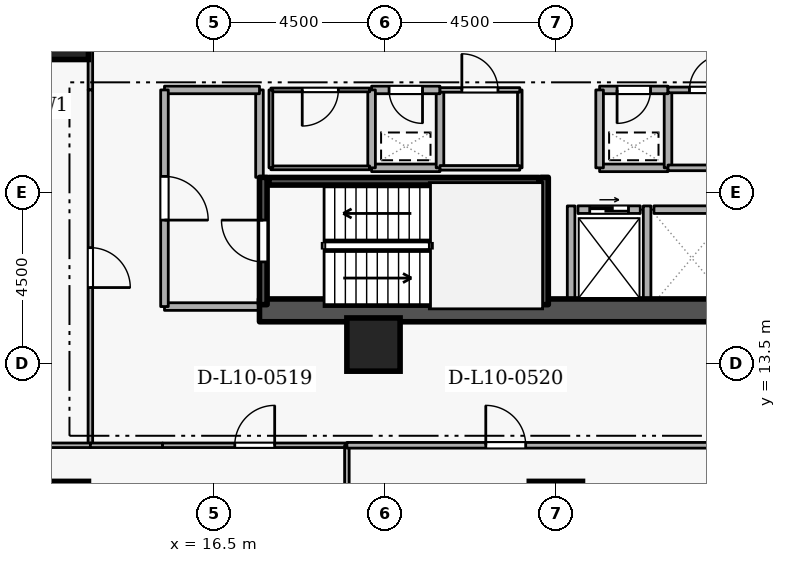
"""IFC4 building model, lengths in metres.
Left out: names, types, materials, properties, quantities, classifications, styles, units other than length and angle.
Written with IfcOpenShell. Run it as: python <this file> out.ifc"""

import sys

from ifc_helpers import new_model, si_unit, direction, frame, frame_2d, origin, origin_2d, place, context, subcontext, project, spatial, rectangle, extrude, element, fill, save


model = new_model("IFC4")
c1 = context("Model", 3, precision=1e-05, world=origin(), true_north=direction((0.0, 1.0)))
c2 = subcontext(c1, "Body", "Model", "MODEL_VIEW")
j1 = project(units=[si_unit("LENGTHUNIT", "METRE"), si_unit("PLANEANGLEUNIT", "RADIAN")], contexts=[c1])
p1 = place(None, origin())
s1 = spatial("IfcSite", under=j1, at=p1, CompositionType="ELEMENT")
p2 = place(p1, origin())
s2 = spatial("IfcBuilding", under=s1, at=p2, CompositionType="ELEMENT")
p3 = place(p2, frame((0.0, 0.0, 42.3)))
s3 = spatial("IfcBuildingStorey", under=s2, at=p3, CompositionType="ELEMENT", Elevation=42.3)
p4 = place(p3, frame((17.7, 14.9, 0.0), z_axis=(0.0, 0.0, 1.0), x_axis=(1.0, 0.0, 0.0)))
e1 = element("IfcWall", 1, at=p4, inside=s3, PredefinedType="SHEAR", context=c2, shape_type="SweptSolid", body=[
    extrude(rectangle(XDim=15.6, YDim=0.6, at=frame_2d((7.8, 0.0))), origin(), (0.0, 0.0, 1.0), 3.6),
])
for number, where, z_axis, x_axis in (
    (2, (12.5, 9.7, 0.0), (0.0, 0.0, 1.0), (1.0, 0.0, 0.0)),
    (3, (25.5, 9.7, 0.0), (0.0, 0.0, 1.0), (1.0, 0.0, 0.0)),
    (4, (12.5, 22.2, 0.0), (0.0, 0.0, 1.0), (1.0, 0.0, 0.0)),
    (5, (20.7, 14.0, 0.0), (0.0, 0.0, 1.0), (1.0, 0.0, 0.0)),
):
    element("IfcColumn", number, at=place(p3, frame(where, z_axis=z_axis, x_axis=x_axis)), inside=s3, PredefinedType="COLUMN", context=c2, shape_type="SweptSolid", body=[
        extrude(rectangle(XDim=1.4, YDim=1.4, at=origin_2d()), origin(), (0.0, 0.0, 1.0), 3.6),
    ])
p5 = place(p3, frame((26.08, 17.55, 0.0), z_axis=(0.0, 0.0, 1.0), x_axis=(1.0, 0.0, 0.0)))
e6 = element("IfcWall", 6, at=p5, inside=s3, PredefinedType="STANDARD", context=c2, shape_type="SweptSolid", body=[
    extrude(rectangle(XDim=1.64, YDim=0.2, at=frame_2d((0.82, 0.0))), origin(), (0.0, 0.0, 1.0), 3.34),
])
p6 = place(p5, frame((0.31, 0.0, 0.0)))
e7 = element("IfcOpeningElement", 7, at=p6, cuts=e6, PredefinedType="OPENING", context=c2, shape_type="SweptSolid", body=[
    extrude(rectangle(XDim=1.02, YDim=2.06, at=frame_2d((0.51, 1.03))), frame((0.0, 0.11, 0.0), z_axis=(0.0, -1.0, 0.0), x_axis=(1.0, 0.0, 0.0)), (0.0, 0.0, 1.0), 0.22),
])
p7 = place(p3, frame((28.08, 17.55, 0.0), z_axis=(0.0, 0.0, 1.0), x_axis=(1.0, 0.0, 0.0)))
e8 = element("IfcWall", 8, at=p7, inside=s3, PredefinedType="STANDARD", context=c2, shape_type="SweptSolid", body=[
    extrude(rectangle(XDim=1.99, YDim=0.2, at=frame_2d((0.995, 0.0))), origin(), (0.0, 0.0, 1.0), 3.34),
])
for number, where, z_axis, x_axis in (
    (9, (27.9, 15.212, 0.0), (0.0, 0.0, 1.0), (0.0, 1.0, 0.0)),
    (10, (25.9, 15.212, 0.0), (0.0, 0.0, 1.0), (0.0, 1.0, 0.0)),
):
    element("IfcWall", number, at=place(p3, frame(where, z_axis=z_axis, x_axis=x_axis)), inside=s3, PredefinedType="STANDARD", context=c2, shape_type="SweptSolid", body=[
        extrude(rectangle(XDim=2.436, YDim=0.2, at=frame_2d((1.218, 0.0))), origin(), (0.0, 0.0, 1.0), 3.34),
    ])
p8 = place(p3, frame((17.8, 15.05, 0.0), z_axis=(0.0, 0.0, 1.0), x_axis=(0.0, 1.0, 0.0)))
e11 = element("IfcWall", 11, at=p8, inside=s3, PredefinedType="SHEAR", context=c2, shape_type="SweptSolid", body=[
    extrude(rectangle(XDim=3.35, YDim=0.2, at=frame_2d((1.675, 0.0))), origin(), (0.0, 0.0, 1.0), 3.6),
])
p9 = place(p8, frame((1.125, 0.0, 0.0)))
e12 = element("IfcOpeningElement", 12, at=p9, cuts=e11, PredefinedType="OPENING", context=c2, shape_type="SweptSolid", body=[
    extrude(rectangle(XDim=1.1, YDim=2.1, at=frame_2d((0.55, 1.05))), frame((0.0, 0.11, 0.0), z_axis=(0.0, -1.0, 0.0), x_axis=(1.0, 0.0, 0.0)), (0.0, 0.0, 1.0), 0.22),
])
p10 = place(p3, frame((25.2, 18.4, 0.0), z_axis=(0.0, 0.0, 1.0), x_axis=(0.0, -1.0, 0.0)))
e13 = element("IfcWall", 13, at=p10, inside=s3, PredefinedType="SHEAR", context=c2, shape_type="SweptSolid", body=[
    extrude(rectangle(XDim=3.35, YDim=0.2, at=frame_2d((1.675, 0.0))), origin(), (0.0, 0.0, 1.0), 3.6),
])
p11 = place(p3, frame((25.05, 18.297, 0.0), z_axis=(0.0, 0.0, 1.0), x_axis=(-1.0, 0.0, 0.0)))
e14 = element("IfcWall", 14, at=p11, inside=s3, PredefinedType="SHEAR", context=c2, shape_type="SweptSolid", body=[
    extrude(rectangle(XDim=7.1, YDim=0.2, at=frame_2d((3.55, 0.0))), origin(), (0.0, 0.0, 1.0), 3.6),
])
p12 = place(p3, frame((15.2, 15.0, 0.0), z_axis=(0.0, 0.0, 1.0), x_axis=(1.0, 0.0, 0.0)))
e15 = element("IfcWall", 15, at=p12, inside=s3, PredefinedType="STANDARD", context=c2, shape_type="SweptSolid", body=[
    extrude(rectangle(XDim=2.5, YDim=0.2, at=frame_2d((1.25, 0.0))), origin(), (0.0, 0.0, 1.0), 3.34),
])
p13 = place(p3, frame((17.7, 18.4, 0.0), z_axis=(0.0, 0.0, 1.0), x_axis=(0.0, 1.0, 0.0)))
e16 = element("IfcWall", 16, at=p13, inside=s3, PredefinedType="STANDARD", context=c2, shape_type="SweptSolid", body=[
    extrude(rectangle(XDim=2.3, YDim=0.2, at=frame_2d((1.15, 0.0))), origin(), (0.0, 0.0, 1.0), 2.545),
])
p14 = place(p3, frame((17.7, 20.7, 0.0), z_axis=(0.0, 0.0, 1.0), x_axis=(-1.0, 0.0, 0.0)))
e17 = element("IfcWall", 17, at=p14, inside=s3, PredefinedType="STANDARD", context=c2, shape_type="SweptSolid", body=[
    extrude(rectangle(XDim=2.5, YDim=0.2, at=frame_2d((1.25, 0.0))), origin(), (0.0, 0.0, 1.0), 3.34),
])
p15 = place(p3, frame((15.2, 20.7, 0.0), z_axis=(0.0, 0.0, 1.0), x_axis=(0.0, -1.0, 0.0)))
e18 = element("IfcWall", 18, at=p15, inside=s3, PredefinedType="STANDARD", context=c2, shape_type="SweptSolid", body=[
    extrude(rectangle(XDim=5.7, YDim=0.2, at=frame_2d((2.85, 0.0))), origin(), (0.0, 0.0, 1.0), 3.34),
])
p16 = place(p15, frame((2.275, 0.0, 0.0)))
e19 = element("IfcOpeningElement", 19, at=p16, cuts=e18, PredefinedType="OPENING", context=c2, shape_type="SweptSolid", body=[
    extrude(rectangle(XDim=1.15, YDim=2.1, at=frame_2d((0.575, 1.05))), frame((0.0, 0.11, 0.0), z_axis=(0.0, -1.0, 0.0), x_axis=(1.0, 0.0, 0.0)), (0.0, 0.0, 1.0), 0.22),
])
p17 = place(p3, frame((26.65, 18.65, 0.0), z_axis=(0.0, 0.0, 1.0), x_axis=(1.0, 0.0, 0.0)))
e20 = element("IfcWall", 20, at=p17, inside=s3, PredefinedType="STANDARD", context=c2, shape_type="SweptSolid", body=[
    extrude(rectangle(XDim=1.8, YDim=0.2, at=frame_2d((0.9, 0.0))), origin(), (0.0, 0.0, 1.0), 3.34),
])
p18 = place(p3, frame((28.45, 18.65, 0.0), z_axis=(0.0, 0.0, 1.0), x_axis=(0.0, 1.0, 0.0)))
e21 = element("IfcWall", 21, at=p18, inside=s3, PredefinedType="STANDARD", context=c2, shape_type="SweptSolid", body=[
    extrude(rectangle(XDim=2.05, YDim=0.2, at=frame_2d((1.025, 0.0))), origin(), (0.0, 0.0, 1.0), 3.34),
])
p19 = place(p3, frame((28.45, 20.7, 0.0), z_axis=(0.0, 0.0, 1.0), x_axis=(-1.0, 0.0, 0.0)))
e22 = element("IfcWall", 22, at=p19, inside=s3, PredefinedType="STANDARD", context=c2, shape_type="SweptSolid", body=[
    extrude(rectangle(XDim=1.8, YDim=0.2, at=frame_2d((0.9, 0.0))), origin(), (0.0, 0.0, 1.0), 3.34),
])
p20 = place(p19, frame((0.46, 0.0, 0.0)))
e23 = element("IfcOpeningElement", 23, at=p20, cuts=e22, PredefinedType="OPENING", context=c2, shape_type="SweptSolid", body=[
    extrude(rectangle(XDim=0.88, YDim=2.04, at=frame_2d((0.44, 1.02))), frame((0.0, 0.11, 0.0), z_axis=(0.0, -1.0, 0.0), x_axis=(1.0, 0.0, 0.0)), (0.0, 0.0, 1.0), 0.22),
])
p21 = place(p3, frame((26.65, 20.7, 0.0), z_axis=(0.0, 0.0, 1.0), x_axis=(0.0, -1.0, 0.0)))
e24 = element("IfcWall", 24, at=p21, inside=s3, PredefinedType="STANDARD", context=c2, shape_type="SweptSolid", body=[
    extrude(rectangle(XDim=2.05, YDim=0.2, at=frame_2d((1.025, 0.0))), origin(), (0.0, 0.0, 1.0), 3.34),
])
p22 = place(p3, frame((20.65, 18.65, 0.0), z_axis=(0.0, 0.0, 1.0), x_axis=(1.0, 0.0, 0.0)))
e25 = element("IfcWall", 25, at=p22, inside=s3, PredefinedType="STANDARD", context=c2, shape_type="SweptSolid", body=[
    extrude(rectangle(XDim=1.8, YDim=0.2, at=frame_2d((0.9, 0.0))), origin(), (0.0, 0.0, 1.0), 3.34),
])
p23 = place(p3, frame((22.45, 18.65, 0.0), z_axis=(0.0, 0.0, 1.0), x_axis=(0.0, 1.0, 0.0)))
e26 = element("IfcWall", 26, at=p23, inside=s3, PredefinedType="STANDARD", context=c2, shape_type="SweptSolid", body=[
    extrude(rectangle(XDim=2.05, YDim=0.2, at=frame_2d((1.025, 0.0))), origin(), (0.0, 0.0, 1.0), 3.34),
])
p24 = place(p3, frame((22.45, 20.7, 0.0), z_axis=(0.0, 0.0, 1.0), x_axis=(-1.0, 0.0, 0.0)))
e27 = element("IfcWall", 27, at=p24, inside=s3, PredefinedType="STANDARD", context=c2, shape_type="SweptSolid", body=[
    extrude(rectangle(XDim=1.8, YDim=0.2, at=frame_2d((0.9, 0.0))), origin(), (0.0, 0.0, 1.0), 3.34),
])
p25 = place(p24, frame((0.46, 0.0, 0.0)))
e28 = element("IfcOpeningElement", 28, at=p25, cuts=e27, PredefinedType="OPENING", context=c2, shape_type="SweptSolid", body=[
    extrude(rectangle(XDim=0.88, YDim=2.04, at=frame_2d((0.44, 1.02))), frame((0.0, 0.11, 0.0), z_axis=(0.0, -1.0, 0.0), x_axis=(1.0, 0.0, 0.0)), (0.0, 0.0, 1.0), 0.22),
])
p26 = place(p3, frame((20.65, 20.7, 0.0), z_axis=(0.0, 0.0, 1.0), x_axis=(0.0, -1.0, 0.0)))
e29 = element("IfcWall", 29, at=p26, inside=s3, PredefinedType="STANDARD", context=c2, shape_type="SweptSolid", body=[
    extrude(rectangle(XDim=2.05, YDim=0.2, at=frame_2d((1.025, 0.0))), origin(), (0.0, 0.0, 1.0), 3.34),
])
p27 = place(p3, frame((18.0, 18.65, 0.0), z_axis=(0.0, 0.0, 1.0), x_axis=(1.0, 0.0, 0.0)))
e30 = element("IfcWall", 30, at=p27, inside=s3, PredefinedType="PARTITIONING", context=c2, shape_type="SweptSolid", body=[
    extrude(rectangle(XDim=2.6, YDim=0.1, at=frame_2d((1.3, 0.0))), origin(), (0.0, 0.0, 1.0), 3.34),
])
p28 = place(p3, frame((20.6, 20.7, 0.0), z_axis=(0.0, 0.0, 1.0), x_axis=(-1.0, 0.0, 0.0)))
e31 = element("IfcWall", 31, at=p28, inside=s3, PredefinedType="PARTITIONING", context=c2, shape_type="SweptSolid", body=[
    extrude(rectangle(XDim=2.6, YDim=0.1, at=frame_2d((1.3, 0.0))), origin(), (0.0, 0.0, 1.0), 3.34),
])
p29 = place(p28, frame((0.825, 0.0, 0.0)))
e32 = element("IfcOpeningElement", 32, at=p29, cuts=e31, PredefinedType="OPENING", context=c2, shape_type="SweptSolid", body=[
    extrude(rectangle(XDim=0.95, YDim=2.1, at=frame_2d((0.475, 1.05))), frame((0.0, 0.06, 0.0), z_axis=(0.0, -1.0, 0.0), x_axis=(1.0, 0.0, 0.0)), (0.0, 0.0, 1.0), 0.12),
])
p30 = place(p3, frame((18.0, 20.7, 0.0), z_axis=(0.0, 0.0, 1.0), x_axis=(0.0, -1.0, 0.0)))
e33 = element("IfcWall", 33, at=p30, inside=s3, PredefinedType="PARTITIONING", context=c2, shape_type="SweptSolid", body=[
    extrude(rectangle(XDim=2.05, YDim=0.1, at=frame_2d((1.025, 0.0))), origin(), (0.0, 0.0, 1.0), 2.545),
])
p31 = place(p3, frame((24.55, 20.7, 0.0), z_axis=(0.0, 0.0, 1.0), x_axis=(0.0, -1.0, 0.0)))
e34 = element("IfcWall", 34, at=p31, inside=s3, PredefinedType="PARTITIONING", context=c2, shape_type="SweptSolid", body=[
    extrude(rectangle(XDim=2.05, YDim=0.12, at=frame_2d((1.025, 0.0))), origin(), (0.0, 0.0, 1.0), 3.34),
])
p32 = place(p3, frame((24.55, 18.65, 0.0), z_axis=(0.0, 0.0, 1.0), x_axis=(-1.0, 0.0, 0.0)))
e35 = element("IfcWall", 35, at=p32, inside=s3, PredefinedType="PARTITIONING", context=c2, shape_type="SweptSolid", body=[
    extrude(rectangle(XDim=2.1, YDim=0.12, at=frame_2d((1.05, 0.0))), origin(), (0.0, 0.0, 1.0), 3.34),
])
p33 = place(p3, frame((22.45, 20.7, 0.0), z_axis=(0.0, 0.0, 1.0), x_axis=(1.0, 0.0, 0.0)))
e36 = element("IfcWall", 36, at=p33, inside=s3, PredefinedType="PARTITIONING", context=c2, shape_type="SweptSolid", body=[
    extrude(rectangle(XDim=2.1, YDim=0.12, at=frame_2d((1.05, 0.0))), origin(), (0.0, 0.0, 1.0), 3.34),
])
p34 = place(p33, frame((0.575, 0.0, 0.0)))
e37 = element("IfcOpeningElement", 37, at=p34, cuts=e36, PredefinedType="OPENING", context=c2, shape_type="SweptSolid", body=[
    extrude(rectangle(XDim=0.95, YDim=2.1, at=frame_2d((0.475, 1.05))), frame((0.0, 0.07, 0.0), z_axis=(0.0, -1.0, 0.0), x_axis=(1.0, 0.0, 0.0)), (0.0, 0.0, 1.0), 0.14),
])
p35 = place(p3, frame((30.5, 18.65, 0.0), z_axis=(0.0, 0.0, 1.0), x_axis=(-1.0, 0.0, 0.0)))
e38 = element("IfcWall", 38, at=p35, inside=s3, PredefinedType="PARTITIONING", context=c2, shape_type="SweptSolid", body=[
    extrude(rectangle(XDim=2.05, YDim=0.15, at=frame_2d((1.025, 0.0))), origin(), (0.0, 0.0, 1.0), 3.34),
])
p36 = place(p3, frame((28.45, 20.7, 0.0), z_axis=(0.0, 0.0, 1.0), x_axis=(1.0, 0.0, 0.0)))
e39 = element("IfcWall", 39, at=p36, inside=s3, PredefinedType="PARTITIONING", context=c2, shape_type="SweptSolid", body=[
    extrude(rectangle(XDim=2.05, YDim=0.15, at=frame_2d((1.025, 0.0))), origin(), (0.0, 0.0, 1.0), 3.34),
])
p37 = place(p36, frame((0.565, 0.0, 0.0)))
e40 = element("IfcOpeningElement", 40, at=p37, cuts=e39, PredefinedType="OPENING", context=c2, shape_type="SweptSolid", body=[
    extrude(rectangle(XDim=0.92, YDim=2.08, at=frame_2d((0.46, 1.04))), frame((0.0, 0.085, 0.0), z_axis=(0.0, -1.0, 0.0), x_axis=(1.0, 0.0, 0.0)), (0.0, 0.0, 1.0), 0.17),
])
p38 = place(p3, frame((13.25, 22.55, 0.0), z_axis=(0.0, 0.0, 1.0), x_axis=(0.0, -1.0, 0.0)))
e41 = element("IfcWall", 41, at=p38, inside=s3, PredefinedType="PARTITIONING", context=c2, shape_type="SweptSolid", body=[
    extrude(rectangle(XDim=1.85, YDim=0.12, at=frame_2d((0.925, 0.0))), origin(), (0.0, 0.0, 1.0), 3.34),
])
p39 = place(p3, frame((13.25, 20.7, 0.0), z_axis=(0.0, 0.0, 1.0), x_axis=(0.0, -1.0, 0.0)))
e42 = element("IfcWall", 42, at=p39, inside=s3, PredefinedType="PARTITIONING", context=c2, shape_type="SweptSolid", body=[
    extrude(rectangle(XDim=9.35, YDim=0.12, at=frame_2d((4.675, 0.0))), origin(), (0.0, 0.0, 1.0), 3.34),
])
p40 = place(p39, frame((4.15, 0.0, 0.0)))
e43 = element("IfcOpeningElement", 43, at=p40, cuts=e42, PredefinedType="OPENING", context=c2, shape_type="SweptSolid", body=[
    extrude(rectangle(XDim=1.05, YDim=2.1, at=frame_2d((0.525, 1.05))), frame((0.0, 0.07, 0.0), z_axis=(0.0, -1.0, 0.0), x_axis=(1.0, 0.0, 0.0)), (0.0, 0.0, 1.0), 0.14),
])
p41 = place(p3, frame((13.25, 11.35, 0.0), z_axis=(0.0, 0.0, 1.0), x_axis=(-1.0, 0.0, 0.0)))
e44 = element("IfcWall", 44, at=p41, inside=s3, PredefinedType="PARTITIONING", context=c2, shape_type="SweptSolid", body=[
    extrude(rectangle(XDim=11.97, YDim=0.12, at=frame_2d((5.985, 0.0))), origin(), (0.0, 0.0, 1.0), 3.34),
])
p42 = place(p3, frame((13.25, 11.35, 0.0), z_axis=(0.0, 0.0, 1.0), x_axis=(1.0, 0.0, 0.0)))
e45 = element("IfcWall", 45, at=p42, inside=s3, PredefinedType="PARTITIONING", context=c2, shape_type="SweptSolid", body=[
    extrude(rectangle(XDim=1.9, YDim=0.12, at=frame_2d((0.95, 0.0))), origin(), (0.0, 0.0, 1.0), 3.34),
])
p43 = place(p3, frame((15.15, 11.35, 0.0), z_axis=(0.0, 0.0, 1.0), x_axis=(1.0, 0.0, 0.0)))
e46 = element("IfcWall", 46, at=p43, inside=s3, PredefinedType="PARTITIONING", context=c2, shape_type="SweptSolid", body=[
    extrude(rectangle(XDim=4.85, YDim=0.12, at=frame_2d((2.425, 0.0))), origin(), (0.0, 0.0, 1.0), 3.34),
])
p44 = place(p43, frame((1.9, 0.0, 0.0)))
e47 = element("IfcOpeningElement", 47, at=p44, cuts=e46, PredefinedType="OPENING", context=c2, shape_type="SweptSolid", body=[
    extrude(rectangle(XDim=1.05, YDim=2.1, at=frame_2d((0.525, 1.05))), frame((0.0, 0.07, 0.0), z_axis=(0.0, -1.0, 0.0), x_axis=(1.0, 0.0, 0.0)), (0.0, 0.0, 1.0), 0.14),
])
p45 = place(p3, frame((20.0, 11.35, 0.0), z_axis=(0.0, 0.0, 1.0), x_axis=(0.0, -1.0, 0.0)))
e48 = element("IfcWall", 48, at=p45, inside=s3, PredefinedType="PARTITIONING", context=c2, shape_type="SweptSolid", body=[
    extrude(rectangle(XDim=8.57, YDim=0.12, at=frame_2d((4.285, 0.0))), origin(), (0.0, 0.0, 1.0), 3.34),
])
p46 = place(p3, frame((20.0, 11.35, 0.0), z_axis=(0.0, 0.0, 1.0), x_axis=(1.0, 0.0, 0.0)))
e49 = element("IfcWall", 49, at=p46, inside=s3, PredefinedType="PARTITIONING", context=c2, shape_type="SweptSolid", body=[
    extrude(rectangle(XDim=11.0, YDim=0.15, at=frame_2d((5.5, 0.0))), origin(), (0.0, 0.0, 1.0), 3.34),
])
p47 = place(p46, frame((3.655, 0.0, 0.0)))
e50 = element("IfcOpeningElement", 50, at=p47, cuts=e49, PredefinedType="OPENING", context=c2, shape_type="SweptSolid", body=[
    extrude(rectangle(XDim=1.05, YDim=2.1, at=frame_2d((0.525, 1.05))), frame((0.0, 0.085, 0.0), z_axis=(0.0, -1.0, 0.0), x_axis=(1.0, 0.0, 0.0)), (0.0, 0.0, 1.0), 0.17),
])
p48 = place(p6, origin())
e51 = element("IfcDoor", 51, at=p48, inside=s3, OperationType="SLIDING_TO_LEFT", PredefinedType="DOOR", context=c2, shape_type="SweptSolid", body=[
    extrude(rectangle(XDim=1.02, YDim=2.06, at=frame_2d((0.51, 1.03))), frame((0.0, 0.025, 0.0), z_axis=(0.0, -1.0, 0.0), x_axis=(1.0, 0.0, 0.0)), (0.0, 0.0, 1.0), 0.05),
])
fill(e7, e51)
p49 = place(p9, origin())
e52 = element("IfcDoor", 52, at=p49, inside=s3, OperationType="SINGLE_SWING_RIGHT", PredefinedType="DOOR", context=c2, shape_type="SweptSolid", body=[
    extrude(rectangle(XDim=1.1, YDim=2.1, at=frame_2d((0.55, 1.05))), frame((0.0, 0.025, 0.0), z_axis=(0.0, -1.0, 0.0), x_axis=(1.0, 0.0, 0.0)), (0.0, 0.0, 1.0), 0.05),
])
fill(e12, e52)
p50 = place(p16, origin())
e53 = element("IfcDoor", 53, at=p50, inside=s3, OperationType="SINGLE_SWING_RIGHT", PredefinedType="DOOR", context=c2, shape_type="SweptSolid", body=[
    extrude(rectangle(XDim=1.15, YDim=2.1, at=frame_2d((0.575, 1.05))), frame((0.0, 0.025, 0.0), z_axis=(0.0, -1.0, 0.0), x_axis=(1.0, 0.0, 0.0)), (0.0, 0.0, 1.0), 0.05),
])
fill(e19, e53)
p51 = place(p20, origin())
e54 = element("IfcDoor", 54, at=p51, inside=s3, OperationType="SINGLE_SWING_RIGHT", PredefinedType="DOOR", context=c2, shape_type="SweptSolid", body=[
    extrude(rectangle(XDim=0.88, YDim=2.04, at=frame_2d((0.44, 1.02))), frame((0.0, 0.025, 0.0), z_axis=(0.0, -1.0, 0.0), x_axis=(1.0, 0.0, 0.0)), (0.0, 0.0, 1.0), 0.05),
])
fill(e23, e54)
p52 = place(p25, origin())
e55 = element("IfcDoor", 55, at=p52, inside=s3, OperationType="SINGLE_SWING_LEFT", PredefinedType="DOOR", context=c2, shape_type="SweptSolid", body=[
    extrude(rectangle(XDim=0.88, YDim=2.04, at=frame_2d((0.44, 1.02))), frame((0.0, 0.025, 0.0), z_axis=(0.0, -1.0, 0.0), x_axis=(1.0, 0.0, 0.0)), (0.0, 0.0, 1.0), 0.05),
])
fill(e28, e55)
p53 = place(p29, origin())
e56 = element("IfcDoor", 56, at=p53, inside=s3, OperationType="SINGLE_SWING_RIGHT", PredefinedType="DOOR", context=c2, shape_type="SweptSolid", body=[
    extrude(rectangle(XDim=0.95, YDim=2.1, at=frame_2d((0.475, 1.05))), frame((0.0, 0.025, 0.0), z_axis=(0.0, -1.0, 0.0), x_axis=(1.0, 0.0, 0.0)), (0.0, 0.0, 1.0), 0.05),
])
fill(e32, e56)
p54 = place(p34, origin())
e57 = element("IfcDoor", 57, at=p54, inside=s3, OperationType="SINGLE_SWING_LEFT", PredefinedType="DOOR", context=c2, shape_type="SweptSolid", body=[
    extrude(rectangle(XDim=0.95, YDim=2.1, at=frame_2d((0.475, 1.05))), frame((0.0, 0.025, 0.0), z_axis=(0.0, -1.0, 0.0), x_axis=(1.0, 0.0, 0.0)), (0.0, 0.0, 1.0), 0.05),
])
fill(e37, e57)
p55 = place(p37, origin())
e58 = element("IfcDoor", 58, at=p55, inside=s3, OperationType="SINGLE_SWING_RIGHT", PredefinedType="DOOR", context=c2, shape_type="SweptSolid", body=[
    extrude(rectangle(XDim=0.92, YDim=2.08, at=frame_2d((0.46, 1.04))), frame((0.0, 0.025, 0.0), z_axis=(0.0, -1.0, 0.0), x_axis=(1.0, 0.0, 0.0)), (0.0, 0.0, 1.0), 0.05),
])
fill(e40, e58)
p56 = place(p40, origin())
e59 = element("IfcDoor", 59, at=p56, inside=s3, OperationType="SINGLE_SWING_RIGHT", PredefinedType="DOOR", context=c2, shape_type="SweptSolid", body=[
    extrude(rectangle(XDim=1.05, YDim=2.1, at=frame_2d((0.525, 1.05))), frame((0.0, 0.025, 0.0), z_axis=(0.0, -1.0, 0.0), x_axis=(1.0, 0.0, 0.0)), (0.0, 0.0, 1.0), 0.05),
])
fill(e43, e59)
p57 = place(p44, origin())
e60 = element("IfcDoor", 60, at=p57, inside=s3, OperationType="SINGLE_SWING_RIGHT", PredefinedType="DOOR", context=c2, shape_type="SweptSolid", body=[
    extrude(rectangle(XDim=1.05, YDim=2.1, at=frame_2d((0.525, 1.05))), frame((0.0, 0.025, 0.0), z_axis=(0.0, -1.0, 0.0), x_axis=(1.0, 0.0, 0.0)), (0.0, 0.0, 1.0), 0.05),
])
fill(e47, e60)
p58 = place(p47, origin())
e61 = element("IfcDoor", 61, at=p58, inside=s3, OperationType="SINGLE_SWING_LEFT", PredefinedType="DOOR", context=c2, shape_type="SweptSolid", body=[
    extrude(rectangle(XDim=1.05, YDim=2.1, at=frame_2d((0.525, 1.05))), frame((0.0, 0.025, 0.0), z_axis=(0.0, -1.0, 0.0), x_axis=(1.0, 0.0, 0.0)), (0.0, 0.0, 1.0), 0.05),
])
fill(e50, e61)
save(model, sys.argv[1])
